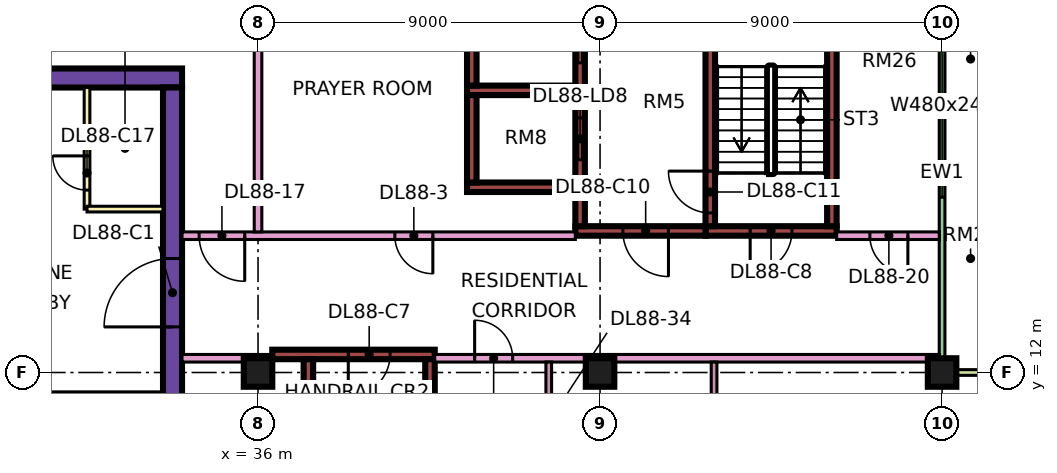
"""IFC4 building model, lengths in metres.
Left out: names, types, materials, properties, quantities, classifications, styles, units other than length and angle.
Written with IfcOpenShell. Run it as: python <this file> out.ifc"""

import sys

from ifc_helpers import new_model, si_unit, direction, frame, frame_2d, origin, origin_2d, place, context, subcontext, project, spatial, rectangle, extrude, element, fill, save


model = new_model("IFC4")
c1 = context("Model", 3, precision=1e-05, world=origin(), true_north=direction((0.0, 1.0)))
c2 = subcontext(c1, "Body", "Model", "MODEL_VIEW")
j1 = project(units=[si_unit("LENGTHUNIT", "METRE"), si_unit("PLANEANGLEUNIT", "RADIAN")], contexts=[c1])
p1 = place(None, origin())
s1 = spatial("IfcSite", under=j1, at=p1, CompositionType="ELEMENT")
p2 = place(p1, origin())
s2 = spatial("IfcBuilding", under=s1, at=p2, CompositionType="ELEMENT")
p3 = place(p2, frame((0.0, 0.0, 376.4)))
s3 = spatial("IfcBuildingStorey", under=s2, at=p3, CompositionType="ELEMENT", Elevation=376.4)
for number, where, z_axis, x_axis in (
    (1, (36.0, 12.0, 0.0), (0.0, 0.0, 1.0), (1.0, 0.0, 0.0)),
    (2, (45.0, 12.0, 0.0), (0.0, 0.0, 1.0), (1.0, 0.0, 0.0)),
    (3, (54.0, 12.0, 0.0), (0.0, 0.0, 1.0), (1.0, 0.0, 0.0)),
):
    element("IfcColumn", number, at=place(p3, frame(where, z_axis=z_axis, x_axis=x_axis)), inside=s3, PredefinedType="COLUMN", context=c2, shape_type="SweptSolid", body=[
        extrude(rectangle(XDim=0.75, YDim=0.75, at=origin_2d()), origin(), (0.0, 0.0, 1.0), 3.75),
    ])
p4 = place(p3, frame((9.0, 19.75, 0.0), z_axis=(0.0, 0.0, 1.0), x_axis=(1.0, 0.0, 0.0)))
e4 = element("IfcWall", 4, at=p4, inside=s3, PredefinedType="SHEAR", context=c2, shape_type="SweptSolid", body=[
    extrude(rectangle(XDim=25.0, YDim=0.5, at=frame_2d((12.5, 0.0))), origin(), (0.0, 0.0, 1.0), 3.75),
])
p5 = place(p4, frame((19.1, 0.0, 0.0)))
e5 = element("IfcOpeningElement", 5, at=p5, cuts=e4, PredefinedType="OPENING", context=c2, shape_type="SweptSolid", body=[
    extrude(rectangle(XDim=1.8, YDim=2.4, at=frame_2d((0.9, 1.2))), frame((0.0, 0.26, 0.0), z_axis=(0.0, -1.0, 0.0), x_axis=(1.0, 0.0, 0.0)), (0.0, 0.0, 1.0), 0.52),
])
p6 = place(p3, frame((33.75, 7.5, 0.0), z_axis=(0.0, 0.0, 1.0), x_axis=(0.0, 1.0, 0.0)))
e6 = element("IfcWall", 6, at=p6, inside=s3, PredefinedType="SHEAR", context=c2, shape_type="SweptSolid", body=[
    extrude(rectangle(XDim=12.0, YDim=0.5, at=frame_2d((6.0, 0.0))), origin(), (0.0, 0.0, 1.0), 3.75),
])
p7 = place(p6, frame((5.7, 0.0, 0.0)))
e7 = element("IfcOpeningElement", 7, at=p7, cuts=e6, PredefinedType="OPENING", context=c2, shape_type="SweptSolid", body=[
    extrude(rectangle(XDim=1.8, YDim=2.4, at=frame_2d((0.9, 1.2))), frame((0.0, 0.26, 0.0), z_axis=(0.0, -1.0, 0.0), x_axis=(1.0, 0.0, 0.0)), (0.0, 0.0, 1.0), 0.52),
])
p8 = place(p3, frame((36.375, 12.475, 0.0), z_axis=(0.0, 0.0, 1.0), x_axis=(1.0, 0.0, 0.0)))
e8 = element("IfcWall", 8, at=p8, inside=s3, PredefinedType="SHEAR", context=c2, shape_type="SweptSolid", body=[
    extrude(rectangle(XDim=4.275, YDim=0.25, at=frame_2d((2.137, 0.0))), origin(), (0.0, 0.0, 1.0), 3.75),
])
p9 = place(p8, frame((2.0, 0.0, 0.0)))
e9 = element("IfcOpeningElement", 9, at=p9, cuts=e8, PredefinedType="OPENING", context=c2, shape_type="SweptSolid", body=[
    extrude(rectangle(XDim=1.1, YDim=2.2, at=frame_2d((0.55, 1.1))), frame((0.0, 0.135, 0.0), z_axis=(0.0, -1.0, 0.0), x_axis=(1.0, 0.0, 0.0)), (0.0, 0.0, 1.0), 0.27),
])
for number, where, z_axis, x_axis in (
    (10, (37.325, 5.85, 0.0), (0.0, 0.0, 1.0), (0.0, 1.0, 0.0)),
    (11, (40.525, 5.85, 0.0), (0.0, 0.0, 1.0), (0.0, 1.0, 0.0)),
):
    element("IfcWall", number, at=place(p3, frame(where, z_axis=z_axis, x_axis=x_axis)), inside=s3, PredefinedType="SHEAR", context=c2, shape_type="SweptSolid", body=[
        extrude(rectangle(XDim=6.5, YDim=0.25, at=frame_2d((3.25, 0.0))), origin(), (0.0, 0.0, 1.0), 3.75),
    ])
p10 = place(p3, frame((47.775, 15.725, 0.0), z_axis=(0.0, 0.0, 1.0), x_axis=(1.0, 0.0, 0.0)))
e12 = element("IfcWall", 12, at=p10, inside=s3, PredefinedType="SHEAR", context=c2, shape_type="SweptSolid", body=[
    extrude(rectangle(XDim=3.45, YDim=0.25, at=frame_2d((1.725, 0.0))), origin(), (0.0, 0.0, 1.0), 3.75),
])
p11 = place(p10, frame((1.175, 0.0, 0.0)))
e13 = element("IfcOpeningElement", 13, at=p11, cuts=e12, PredefinedType="OPENING", context=c2, shape_type="SweptSolid", body=[
    extrude(rectangle(XDim=1.1, YDim=2.2, at=frame_2d((0.55, 1.1))), frame((0.0, 0.135, 0.0), z_axis=(0.0, -1.0, 0.0), x_axis=(1.0, 0.0, 0.0)), (0.0, 0.0, 1.0), 0.27),
])
p12 = place(p3, frame((47.9, 15.85, 0.0), z_axis=(0.0, 0.0, 1.0), x_axis=(0.0, 1.0, 0.0)))
e14 = element("IfcWall", 14, at=p12, inside=s3, PredefinedType="SHEAR", context=c2, shape_type="SweptSolid", body=[
    extrude(rectangle(XDim=6.5, YDim=0.25, at=frame_2d((3.25, 0.0))), origin(), (0.0, 0.0, 1.0), 3.75),
])
p13 = place(p12, frame((0.35, 0.0, 0.0)))
e15 = element("IfcOpeningElement", 15, at=p13, cuts=e14, PredefinedType="OPENING", context=c2, shape_type="SweptSolid", body=[
    extrude(rectangle(XDim=1.1, YDim=2.2, at=frame_2d((0.55, 1.1))), frame((0.0, 0.135, 0.0), z_axis=(0.0, -1.0, 0.0), x_axis=(1.0, 0.0, 0.0)), (0.0, 0.0, 1.0), 0.27),
])
p14 = place(p3, frame((51.1, 15.85, 0.0), z_axis=(0.0, 0.0, 1.0), x_axis=(0.0, 1.0, 0.0)))
e16 = element("IfcWall", 16, at=p14, inside=s3, PredefinedType="SHEAR", context=c2, shape_type="SweptSolid", body=[
    extrude(rectangle(XDim=6.5, YDim=0.25, at=frame_2d((3.25, 0.0))), origin(), (0.0, 0.0, 1.0), 3.75),
])
p15 = place(p3, frame((44.35, 15.725, 0.0), z_axis=(0.0, 0.0, 1.0), x_axis=(1.0, 0.0, 0.0)))
e17 = element("IfcWall", 17, at=p15, inside=s3, PredefinedType="SHEAR", context=c2, shape_type="SweptSolid", body=[
    extrude(rectangle(XDim=3.425, YDim=0.25, at=frame_2d((1.712, 0.0))), origin(), (0.0, 0.0, 1.0), 3.75),
])
p16 = place(p15, frame((1.25, 0.0, 0.0)))
e18 = element("IfcOpeningElement", 18, at=p16, cuts=e17, PredefinedType="OPENING", context=c2, shape_type="SweptSolid", body=[
    extrude(rectangle(XDim=1.2, YDim=2.2, at=frame_2d((0.6, 1.1))), frame((0.0, 0.135, 0.0), z_axis=(0.0, -1.0, 0.0), x_axis=(1.0, 0.0, 0.0)), (0.0, 0.0, 1.0), 0.27),
])
p17 = place(p3, frame((44.475, 15.85, 0.0), z_axis=(0.0, 0.0, 1.0), x_axis=(0.0, 1.0, 0.0)))
e19 = element("IfcWall", 19, at=p17, inside=s3, PredefinedType="SHEAR", context=c2, shape_type="SweptSolid", body=[
    extrude(rectangle(XDim=6.5, YDim=0.25, at=frame_2d((3.25, 0.0))), origin(), (0.0, 0.0, 1.0), 3.75),
])
p18 = place(p17, frame((1.75, 0.0, 0.0)))
e20 = element("IfcOpeningElement", 20, at=p18, cuts=e19, PredefinedType="OPENING", context=c2, shape_type="SweptSolid", body=[
    extrude(rectangle(XDim=1.1, YDim=2.2, at=frame_2d((0.55, 1.1))), frame((0.0, 0.135, 0.0), z_axis=(0.0, -1.0, 0.0), x_axis=(1.0, 0.0, 0.0)), (0.0, 0.0, 1.0), 0.27),
])
p19 = place(p17, frame((4.3, 0.0, 0.0)))
e21 = element("IfcOpeningElement", 21, at=p19, cuts=e19, PredefinedType="OPENING", context=c2, shape_type="SweptSolid", body=[
    extrude(rectangle(XDim=1.1, YDim=2.2, at=frame_2d((0.55, 1.1))), frame((0.0, 0.135, 0.0), z_axis=(0.0, -1.0, 0.0), x_axis=(1.0, 0.0, 0.0)), (0.0, 0.0, 1.0), 0.27),
])
for number, where, z_axis, x_axis in (
    (22, (41.5, 16.875, 0.0), (0.0, 0.0, 1.0), (1.0, 0.0, 0.0)),
    (23, (41.5, 19.425, 0.0), (0.0, 0.0, 1.0), (1.0, 0.0, 0.0)),
):
    element("IfcWall", number, at=place(p3, frame(where, z_axis=z_axis, x_axis=x_axis)), inside=s3, PredefinedType="SHEAR", context=c2, shape_type="SweptSolid", body=[
        extrude(rectangle(XDim=2.85, YDim=0.25, at=frame_2d((1.425, 0.0))), origin(), (0.0, 0.0, 1.0), 3.75),
    ])
for number, where, z_axis, x_axis in (
    (24, (41.625, 17.0, 0.0), (0.0, 0.0, 1.0), (0.0, 1.0, 0.0)),
    (25, (41.625, 19.55, 0.0), (0.0, 0.0, 1.0), (0.0, 1.0, 0.0)),
):
    element("IfcWall", number, at=place(p3, frame(where, z_axis=z_axis, x_axis=x_axis)), inside=s3, PredefinedType="SHEAR", context=c2, shape_type="SweptSolid", body=[
        extrude(rectangle(XDim=2.3, YDim=0.25, at=frame_2d((1.15, 0.0))), origin(), (0.0, 0.0, 1.0), 3.75),
    ])
p20 = place(p3, frame((54.0, 12.075, 0.0), z_axis=(0.0, 0.0, 1.0), x_axis=(0.0, 1.0, 0.0)))
e26 = element("IfcWall", 26, at=p20, inside=s3, PredefinedType="SOLIDWALL", context=c2, shape_type="SweptSolid", body=[
    extrude(rectangle(XDim=10.35, YDim=0.15, at=frame_2d((5.175, 0.0))), origin(), (0.0, 0.0, 1.0), 3.35),
])
p21 = place(p20, frame((4.538, 0.0, 0.45)))
e27 = element("IfcOpeningElement", 27, at=p21, cuts=e26, PredefinedType="OPENING", context=c2, shape_type="SweptSolid", body=[
    extrude(rectangle(XDim=4.8, YDim=2.4, at=frame_2d((2.4, 1.2))), frame((0.0, 0.085, 0.0), z_axis=(0.0, -1.0, 0.0), x_axis=(1.0, 0.0, 0.0)), (0.0, 0.0, 1.0), 0.17),
])
p22 = place(p3, frame((55.5, 12.0, 0.0), z_axis=(0.0, 0.0, 1.0), x_axis=(-1.0, 0.0, 0.0)))
e28 = element("IfcWall", 28, at=p22, inside=s3, PredefinedType="SOLIDWALL", context=c2, shape_type="SweptSolid", body=[
    extrude(rectangle(XDim=1.5, YDim=0.15, at=frame_2d((0.75, 0.0))), origin(), (0.0, 0.0, 1.0), 3.35),
])
p23 = place(p3, frame((31.5, 16.3, 0.0), z_axis=(0.0, 0.0, 1.0), x_axis=(0.0, 1.0, 0.0)))
e29 = element("IfcWall", 29, at=p23, inside=s3, PredefinedType="PARTITIONING", context=c2, shape_type="SweptSolid", body=[
    extrude(rectangle(XDim=3.2, YDim=0.15, at=frame_2d((1.6, 0.0))), origin(), (0.0, 0.0, 1.0), 3.35),
])
p24 = place(p23, frame((0.5, 0.0, 0.0)))
e30 = element("IfcOpeningElement", 30, at=p24, cuts=e29, PredefinedType="OPENING", context=c2, shape_type="SweptSolid", body=[
    extrude(rectangle(XDim=0.9, YDim=2.1, at=frame_2d((0.45, 1.05))), frame((0.0, 0.085, 0.0), z_axis=(0.0, -1.0, 0.0), x_axis=(1.0, 0.0, 0.0)), (0.0, 0.0, 1.0), 0.17),
])
p25 = place(p3, frame((31.5, 16.3, 0.0), z_axis=(0.0, 0.0, 1.0), x_axis=(1.0, 0.0, 0.0)))
e31 = element("IfcWall", 31, at=p25, inside=s3, PredefinedType="PARTITIONING", context=c2, shape_type="SweptSolid", body=[
    extrude(rectangle(XDim=2.0, YDim=0.15, at=frame_2d((1.0, 0.0))), origin(), (0.0, 0.0, 1.0), 3.35),
])
p26 = place(p3, frame((34.0, 12.375, 0.0), z_axis=(0.0, 0.0, 1.0), x_axis=(1.0, 0.0, 0.0)))
e32 = element("IfcWall", 32, at=p26, inside=s3, PredefinedType="PARTITIONING", context=c2, shape_type="SweptSolid", body=[
    extrude(rectangle(XDim=2.376, YDim=0.2, at=frame_2d((1.188, 0.0))), origin(), (0.0, 0.0, 1.0), 3.35),
])
p27 = place(p3, frame((34.0, 15.6, 0.0), z_axis=(0.0, 0.0, 1.0), x_axis=(1.0, 0.0, 0.0)))
e33 = element("IfcWall", 33, at=p27, inside=s3, PredefinedType="PARTITIONING", context=c2, shape_type="SweptSolid", body=[
    extrude(rectangle(XDim=10.35, YDim=0.2, at=frame_2d((5.175, 0.0))), origin(), (0.0, 0.0, 1.0), 3.35),
])
p28 = place(p27, frame((5.6, 0.0, 0.0)))
e34 = element("IfcOpeningElement", 34, at=p28, cuts=e33, PredefinedType="OPENING", context=c2, shape_type="SweptSolid", body=[
    extrude(rectangle(XDim=1.0, YDim=2.1, at=frame_2d((0.5, 1.05))), frame((0.0, 0.11, 0.0), z_axis=(0.0, -1.0, 0.0), x_axis=(1.0, 0.0, 0.0)), (0.0, 0.0, 1.0), 0.22),
])
p29 = place(p27, frame((0.45, 0.0, 0.0)))
e35 = element("IfcOpeningElement", 35, at=p29, cuts=e33, PredefinedType="OPENING", context=c2, shape_type="SweptSolid", body=[
    extrude(rectangle(XDim=1.2, YDim=2.1, at=frame_2d((0.6, 1.05))), frame((0.0, 0.11, 0.0), z_axis=(0.0, -1.0, 0.0), x_axis=(1.0, 0.0, 0.0)), (0.0, 0.0, 1.0), 0.22),
])
p30 = place(p3, frame((36.0, 15.7, 0.0), z_axis=(0.0, 0.0, 1.0), x_axis=(0.0, 1.0, 0.0)))
e36 = element("IfcWall", 36, at=p30, inside=s3, PredefinedType="PARTITIONING", context=c2, shape_type="SweptSolid", body=[
    extrude(rectangle(XDim=8.3, YDim=0.2, at=frame_2d((4.15, 0.0))), origin(), (0.0, 0.0, 1.0), 3.35),
])
p31 = place(p3, frame((40.65, 12.375, 0.0), z_axis=(0.0, 0.0, 1.0), x_axis=(1.0, 0.0, 0.0)))
e37 = element("IfcWall", 37, at=p31, inside=s3, PredefinedType="PARTITIONING", context=c2, shape_type="SweptSolid", body=[
    extrude(rectangle(XDim=13.276, YDim=0.2, at=frame_2d((6.638, 0.0))), origin(), (0.0, 0.0, 1.0), 3.35),
])
p32 = place(p31, frame((1.05, 0.0, 0.0)))
e38 = element("IfcOpeningElement", 38, at=p32, cuts=e37, PredefinedType="OPENING", context=c2, shape_type="SweptSolid", body=[
    extrude(rectangle(XDim=1.0, YDim=2.1, at=frame_2d((0.5, 1.05))), frame((0.0, 0.11, 0.0), z_axis=(0.0, -1.0, 0.0), x_axis=(1.0, 0.0, 0.0)), (0.0, 0.0, 1.0), 0.22),
])
p33 = place(p3, frame((43.65, 5.975, 0.0), z_axis=(0.0, 0.0, 1.0), x_axis=(0.0, 1.0, 0.0)))
e39 = element("IfcWall", 39, at=p33, inside=s3, PredefinedType="PARTITIONING", context=c2, shape_type="SweptSolid", body=[
    extrude(rectangle(XDim=6.3, YDim=0.15, at=frame_2d((3.15, 0.0))), origin(), (0.0, 0.0, 1.0), 3.35),
])
p34 = place(p33, frame((4.275, 0.0, 0.0)))
e40 = element("IfcOpeningElement", 40, at=p34, cuts=e39, PredefinedType="OPENING", context=c2, shape_type="SweptSolid", body=[
    extrude(rectangle(XDim=0.9, YDim=2.1, at=frame_2d((0.45, 1.05))), frame((0.0, 0.085, 0.0), z_axis=(0.0, -1.0, 0.0), x_axis=(1.0, 0.0, 0.0)), (0.0, 0.0, 1.0), 0.17),
])
p35 = place(p3, frame((48.0, 5.975, 0.0), z_axis=(0.0, 0.0, 1.0), x_axis=(0.0, 1.0, 0.0)))
e41 = element("IfcWall", 41, at=p35, inside=s3, PredefinedType="PARTITIONING", context=c2, shape_type="SweptSolid", body=[
    extrude(rectangle(XDim=6.3, YDim=0.15, at=frame_2d((3.15, 0.0))), origin(), (0.0, 0.0, 1.0), 3.35),
])
p36 = place(p3, frame((51.225, 15.6, 0.0), z_axis=(0.0, 0.0, 1.0), x_axis=(1.0, 0.0, 0.0)))
e42 = element("IfcWall", 42, at=p36, inside=s3, PredefinedType="PARTITIONING", context=c2, shape_type="SweptSolid", body=[
    extrude(rectangle(XDim=2.701, YDim=0.2, at=frame_2d((1.351, 0.0))), origin(), (0.0, 0.0, 1.0), 3.35),
])
p37 = place(p36, frame((0.875, 0.0, 0.0)))
e43 = element("IfcOpeningElement", 43, at=p37, cuts=e42, PredefinedType="OPENING", context=c2, shape_type="SweptSolid", body=[
    extrude(rectangle(XDim=1.0, YDim=2.1, at=frame_2d((0.5, 1.05))), frame((0.0, 0.11, 0.0), z_axis=(0.0, -1.0, 0.0), x_axis=(1.0, 0.0, 0.0)), (0.0, 0.0, 1.0), 0.22),
])
p38 = place(p21, origin())
e44 = element("IfcWindow", 44, at=p38, inside=s3, PartitioningType="SINGLE_PANEL", PredefinedType="WINDOW", context=c2, shape_type="SweptSolid", body=[
    extrude(rectangle(XDim=4.8, YDim=2.4, at=frame_2d((2.4, 1.2))), frame((0.0, 0.03, 0.0), z_axis=(0.0, -1.0, 0.0), x_axis=(1.0, 0.0, 0.0)), (0.0, 0.0, 1.0), 0.06),
])
fill(e27, e44)
p39 = place(p7, origin())
e45 = element("IfcDoor", 45, at=p39, inside=s3, OperationType="DOUBLE_DOOR_SINGLE_SWING", PredefinedType="DOOR", context=c2, shape_type="SweptSolid", body=[
    extrude(rectangle(XDim=1.8, YDim=2.4, at=frame_2d((0.9, 1.2))), frame((0.0, 0.025, 0.0), z_axis=(0.0, -1.0, 0.0), x_axis=(1.0, 0.0, 0.0)), (0.0, 0.0, 1.0), 0.05),
])
fill(e7, e45)
p40 = place(p9, frame((1.1, 0.0, 0.0), z_axis=(0.0, 0.0, 1.0), x_axis=(-1.0, 0.0, 0.0)))
e46 = element("IfcDoor", 46, at=p40, inside=s3, OperationType="SINGLE_SWING_LEFT", PredefinedType="DOOR", context=c2, shape_type="SweptSolid", body=[
    extrude(rectangle(XDim=1.1, YDim=2.2, at=frame_2d((0.55, 1.1))), frame((0.0, 0.025, 0.0), z_axis=(0.0, -1.0, 0.0), x_axis=(1.0, 0.0, 0.0)), (0.0, 0.0, 1.0), 0.05),
])
fill(e9, e46)
p41 = place(p11, frame((1.1, 0.0, 0.0), z_axis=(0.0, 0.0, 1.0), x_axis=(-1.0, 0.0, 0.0)))
e47 = element("IfcDoor", 47, at=p41, inside=s3, OperationType="SINGLE_SWING_LEFT", PredefinedType="DOOR", context=c2, shape_type="SweptSolid", body=[
    extrude(rectangle(XDim=1.1, YDim=2.2, at=frame_2d((0.55, 1.1))), frame((0.0, 0.025, 0.0), z_axis=(0.0, -1.0, 0.0), x_axis=(1.0, 0.0, 0.0)), (0.0, 0.0, 1.0), 0.05),
])
fill(e13, e47)
p42 = place(p16, origin())
e48 = element("IfcDoor", 48, at=p42, inside=s3, OperationType="SINGLE_SWING_RIGHT", PredefinedType="DOOR", context=c2, shape_type="SweptSolid", body=[
    extrude(rectangle(XDim=1.2, YDim=2.2, at=frame_2d((0.6, 1.1))), frame((0.0, 0.025, 0.0), z_axis=(0.0, -1.0, 0.0), x_axis=(1.0, 0.0, 0.0)), (0.0, 0.0, 1.0), 0.05),
])
fill(e18, e48)
p43 = place(p13, frame((1.1, 0.0, 0.0), z_axis=(0.0, 0.0, 1.0), x_axis=(-1.0, 0.0, 0.0)))
e49 = element("IfcDoor", 49, at=p43, inside=s3, OperationType="SINGLE_SWING_RIGHT", PredefinedType="DOOR", context=c2, shape_type="SweptSolid", body=[
    extrude(rectangle(XDim=1.1, YDim=2.2, at=frame_2d((0.55, 1.1))), frame((0.0, 0.025, 0.0), z_axis=(0.0, -1.0, 0.0), x_axis=(1.0, 0.0, 0.0)), (0.0, 0.0, 1.0), 0.05),
])
fill(e15, e49)
p44 = place(p18, origin())
e50 = element("IfcDoor", 50, at=p44, inside=s3, OperationType="DOUBLE_DOOR_SLIDING", PredefinedType="DOOR", context=c2, shape_type="SweptSolid", body=[
    extrude(rectangle(XDim=1.1, YDim=2.2, at=frame_2d((0.55, 1.1))), frame((0.0, 0.025, 0.0), z_axis=(0.0, -1.0, 0.0), x_axis=(1.0, 0.0, 0.0)), (0.0, 0.0, 1.0), 0.05),
])
fill(e20, e50)
p45 = place(p19, origin())
e51 = element("IfcDoor", 51, at=p45, inside=s3, OperationType="DOUBLE_DOOR_SLIDING", PredefinedType="DOOR", context=c2, shape_type="SweptSolid", body=[
    extrude(rectangle(XDim=1.1, YDim=2.2, at=frame_2d((0.55, 1.1))), frame((0.0, 0.025, 0.0), z_axis=(0.0, -1.0, 0.0), x_axis=(1.0, 0.0, 0.0)), (0.0, 0.0, 1.0), 0.05),
])
fill(e21, e51)
p46 = place(p24, frame((0.9, 0.0, 0.0), z_axis=(0.0, 0.0, 1.0), x_axis=(-1.0, 0.0, 0.0)))
e52 = element("IfcDoor", 52, at=p46, inside=s3, OperationType="SINGLE_SWING_RIGHT", PredefinedType="DOOR", context=c2, shape_type="SweptSolid", body=[
    extrude(rectangle(XDim=0.9, YDim=2.1, at=frame_2d((0.45, 1.05))), frame((0.0, 0.025, 0.0), z_axis=(0.0, -1.0, 0.0), x_axis=(1.0, 0.0, 0.0)), (0.0, 0.0, 1.0), 0.05),
])
fill(e30, e52)
p47 = place(p28, origin())
e53 = element("IfcDoor", 53, at=p47, inside=s3, OperationType="SINGLE_SWING_RIGHT", PredefinedType="DOOR", context=c2, shape_type="SweptSolid", body=[
    extrude(rectangle(XDim=1.0, YDim=2.1, at=frame_2d((0.5, 1.05))), frame((0.0, 0.025, 0.0), z_axis=(0.0, -1.0, 0.0), x_axis=(1.0, 0.0, 0.0)), (0.0, 0.0, 1.0), 0.05),
])
fill(e34, e53)
p48 = place(p29, origin())
e54 = element("IfcDoor", 54, at=p48, inside=s3, OperationType="SINGLE_SWING_RIGHT", PredefinedType="DOOR", context=c2, shape_type="SweptSolid", body=[
    extrude(rectangle(XDim=1.2, YDim=2.1, at=frame_2d((0.6, 1.05))), frame((0.0, 0.025, 0.0), z_axis=(0.0, -1.0, 0.0), x_axis=(1.0, 0.0, 0.0)), (0.0, 0.0, 1.0), 0.05),
])
fill(e35, e54)
p49 = place(p37, origin())
e55 = element("IfcDoor", 55, at=p49, inside=s3, OperationType="SINGLE_SWING_RIGHT", PredefinedType="DOOR", context=c2, shape_type="SweptSolid", body=[
    extrude(rectangle(XDim=1.0, YDim=2.1, at=frame_2d((0.5, 1.05))), frame((0.0, 0.025, 0.0), z_axis=(0.0, -1.0, 0.0), x_axis=(1.0, 0.0, 0.0)), (0.0, 0.0, 1.0), 0.05),
])
fill(e43, e55)
p50 = place(p32, origin())
e56 = element("IfcDoor", 56, at=p50, inside=s3, OperationType="SINGLE_SWING_LEFT", PredefinedType="DOOR", context=c2, shape_type="SweptSolid", body=[
    extrude(rectangle(XDim=1.0, YDim=2.1, at=frame_2d((0.5, 1.05))), frame((0.0, 0.025, 0.0), z_axis=(0.0, -1.0, 0.0), x_axis=(1.0, 0.0, 0.0)), (0.0, 0.0, 1.0), 0.05),
])
fill(e38, e56)
save(model, sys.argv[1])
